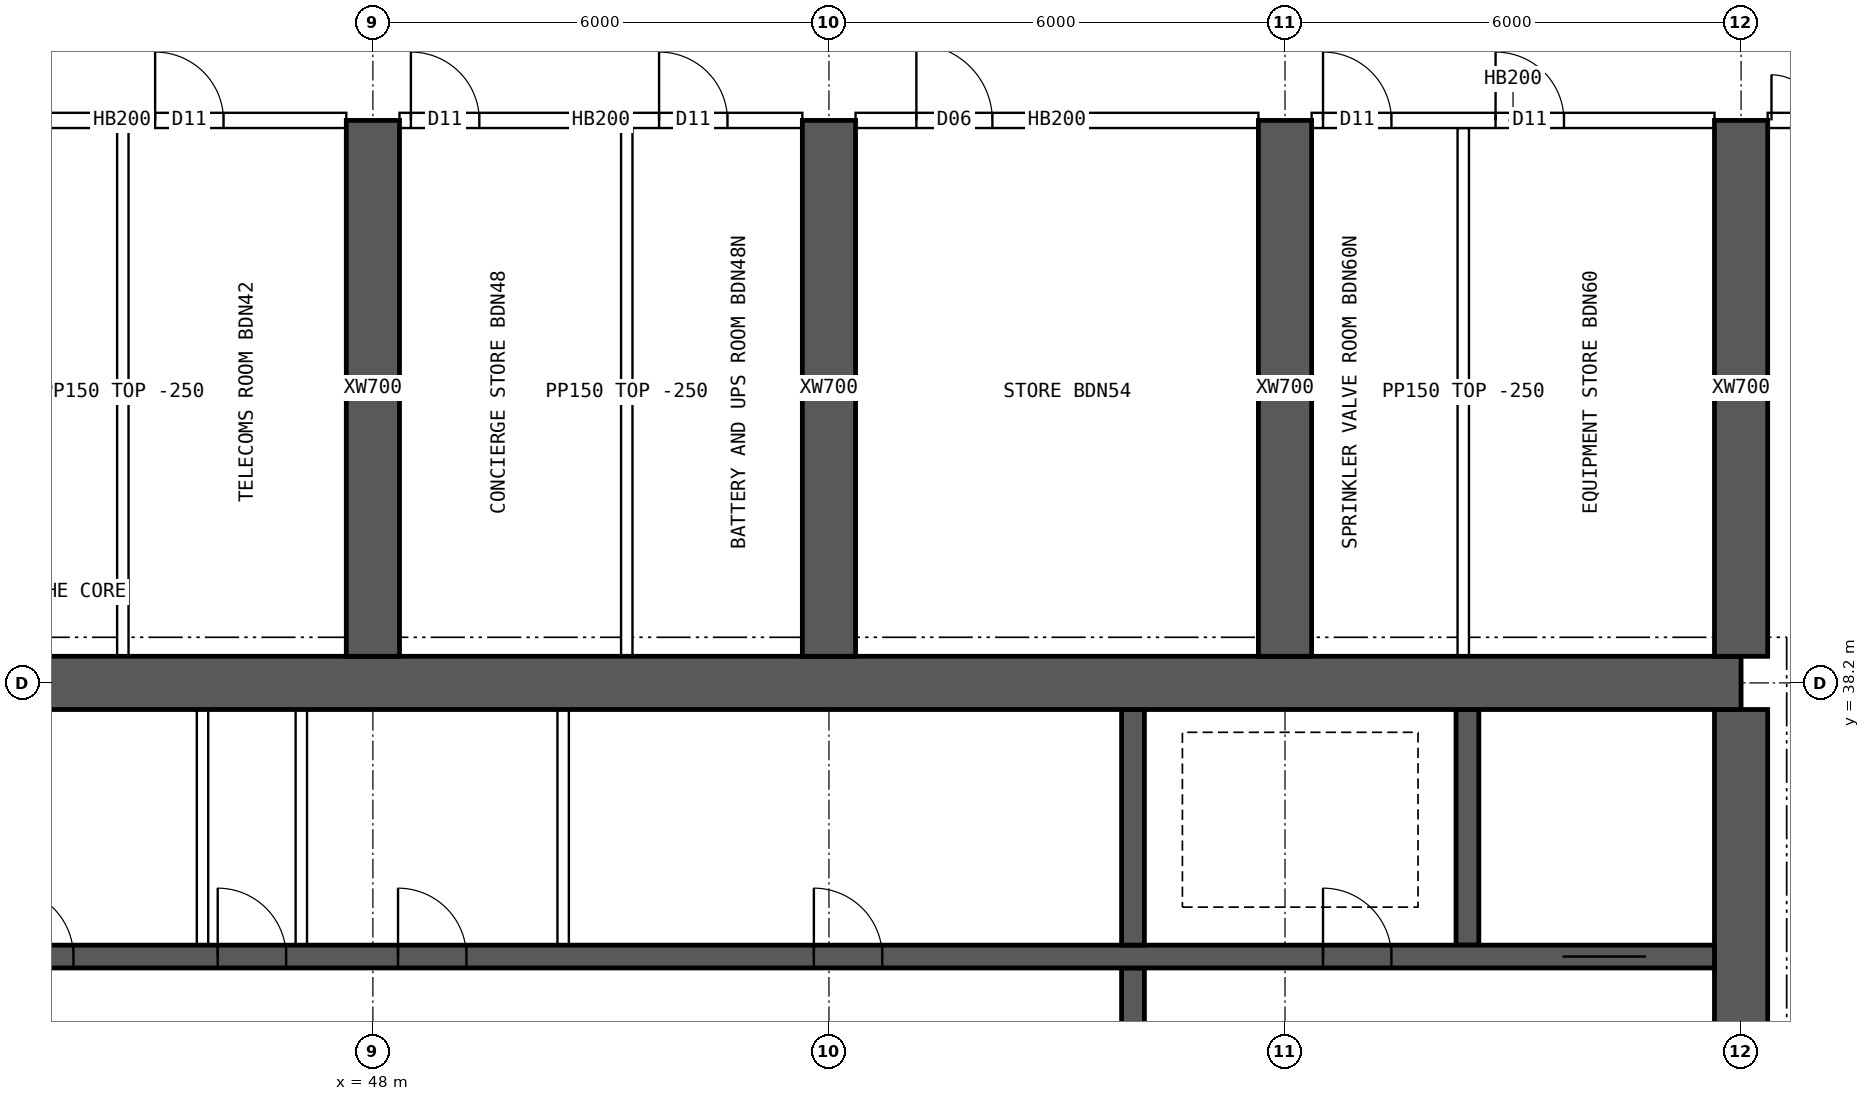
"""IFC4 building model, lengths in metres.
Left out: names, types, materials, properties, quantities, classifications, styles, units other than length and angle.
Written with IfcOpenShell. Run it as: python <this file> out.ifc"""

import sys

from ifc_helpers import new_model, si_unit, direction, frame, frame_2d, origin, place, context, subcontext, project, spatial, rectangle, extrude, element, fill, save


model = new_model("IFC4")
c1 = context("Model", 3, precision=1e-05, world=origin(), true_north=direction((0.0, 1.0)))
c2 = subcontext(c1, "Body", "Model", "MODEL_VIEW")
j1 = project(units=[si_unit("LENGTHUNIT", "METRE"), si_unit("PLANEANGLEUNIT", "RADIAN")], contexts=[c1])
p1 = place(None, origin())
s1 = spatial("IfcSite", under=j1, at=p1, CompositionType="ELEMENT")
p2 = place(p1, origin())
s2 = spatial("IfcBuilding", under=s1, at=p2, CompositionType="ELEMENT")
p3 = place(p2, frame((0.0, 0.0, 208.3)))
s3 = spatial("IfcBuildingStorey", under=s2, at=p3, CompositionType="ELEMENT", Elevation=208.3)
p4 = place(p3, frame((18.0, 38.2, 0.0), z_axis=(0.0, 0.0, 1.0), x_axis=(1.0, 0.0, 0.0)))
e1 = element("IfcWall", 1, at=p4, inside=s3, PredefinedType="SHEAR", context=c2, shape_type="SweptSolid", body=[
    extrude(rectangle(XDim=48.0, YDim=0.7, at=frame_2d((24.0, 0.0))), origin(), (0.0, 0.0, 1.0), 4.5),
])
p5 = place(p3, frame((66.0, 26.15, 0.0), z_axis=(0.0, 0.0, 1.0), x_axis=(0.0, 1.0, 0.0)))
e2 = element("IfcWall", 2, at=p5, inside=s3, PredefinedType="SHEAR", context=c2, shape_type="SweptSolid", body=[
    extrude(rectangle(XDim=11.7, YDim=0.7, at=frame_2d((5.85, 0.0))), origin(), (0.0, 0.0, 1.0), 4.5),
])
p6 = place(p5, frame((5.15, 0.0, 0.0)))
e3 = element("IfcOpeningElement", 3, at=p6, cuts=e2, PredefinedType="OPENING", context=c2, shape_type="SweptSolid", body=[
    extrude(rectangle(XDim=1.2, YDim=2.1, at=frame_2d((0.6, 1.05))), frame((0.0, 0.36, 0.0), z_axis=(0.0, -1.0, 0.0), x_axis=(1.0, 0.0, 0.0)), (0.0, 0.0, 1.0), 0.72),
])
p7 = place(p3, frame((18.35, 34.6, 0.0), z_axis=(0.0, 0.0, 1.0), x_axis=(1.0, 0.0, 0.0)))
e4 = element("IfcWall", 4, at=p7, inside=s3, PredefinedType="SHEAR", context=c2, shape_type="SweptSolid", body=[
    extrude(rectangle(XDim=47.3, YDim=0.3, at=frame_2d((23.65, 0.0))), origin(), (0.0, 0.0, 1.0), 4.5),
])
p8 = place(p7, frame((0.9, 0.0, 0.0)))
e5 = element("IfcOpeningElement", 5, at=p8, cuts=e4, PredefinedType="OPENING", context=c2, shape_type="SweptSolid", body=[
    extrude(rectangle(XDim=1.1, YDim=2.1, at=frame_2d((0.55, 1.05))), frame((0.0, 0.16, 0.0), z_axis=(0.0, -1.0, 0.0), x_axis=(1.0, 0.0, 0.0)), (0.0, 0.0, 1.0), 0.32),
])
p9 = place(p7, frame((45.3, 0.0, 0.0)))
e6 = element("IfcOpeningElement", 6, at=p9, cuts=e4, PredefinedType="OPENING", context=c2, shape_type="SweptSolid", body=[
    extrude(rectangle(XDim=1.1, YDim=2.1, at=frame_2d((0.55, 1.05))), frame((0.0, 0.16, 0.0), z_axis=(0.0, -1.0, 0.0), x_axis=(1.0, 0.0, 0.0)), (0.0, 0.0, 1.0), 0.32),
])
p10 = place(p7, frame((4.25, 0.0, 0.0)))
e7 = element("IfcOpeningElement", 7, at=p10, cuts=e4, PredefinedType="OPENING", context=c2, shape_type="SweptSolid", body=[
    extrude(rectangle(XDim=0.9, YDim=2.1, at=frame_2d((0.45, 1.05))), frame((0.0, 0.16, 0.0), z_axis=(0.0, -1.0, 0.0), x_axis=(1.0, 0.0, 0.0)), (0.0, 0.0, 1.0), 0.32),
])
p11 = place(p7, frame((42.15, 0.0, 0.0)))
e8 = element("IfcOpeningElement", 8, at=p11, cuts=e4, PredefinedType="OPENING", context=c2, shape_type="SweptSolid", body=[
    extrude(rectangle(XDim=0.9, YDim=2.1, at=frame_2d((0.45, 1.05))), frame((0.0, 0.16, 0.0), z_axis=(0.0, -1.0, 0.0), x_axis=(1.0, 0.0, 0.0)), (0.0, 0.0, 1.0), 0.32),
])
p12 = place(p7, frame((9.025, 0.0, 0.0)))
e9 = element("IfcOpeningElement", 9, at=p12, cuts=e4, PredefinedType="OPENING", context=c2, shape_type="SweptSolid", body=[
    extrude(rectangle(XDim=0.9, YDim=2.1, at=frame_2d((0.45, 1.05))), frame((0.0, 0.16, 0.0), z_axis=(0.0, -1.0, 0.0), x_axis=(1.0, 0.0, 0.0)), (0.0, 0.0, 1.0), 0.32),
])
p13 = place(p7, frame((12.999, 0.0, 0.0)))
e10 = element("IfcOpeningElement", 10, at=p13, cuts=e4, PredefinedType="OPENING", context=c2, shape_type="SweptSolid", body=[
    extrude(rectangle(XDim=0.9, YDim=2.1, at=frame_2d((0.45, 1.05))), frame((0.0, 0.16, 0.0), z_axis=(0.0, -1.0, 0.0), x_axis=(1.0, 0.0, 0.0)), (0.0, 0.0, 1.0), 0.32),
])
p14 = place(p7, frame((16.646, 0.0, 0.0)))
e11 = element("IfcOpeningElement", 11, at=p14, cuts=e4, PredefinedType="OPENING", context=c2, shape_type="SweptSolid", body=[
    extrude(rectangle(XDim=0.9, YDim=2.1, at=frame_2d((0.45, 1.05))), frame((0.0, 0.16, 0.0), z_axis=(0.0, -1.0, 0.0), x_axis=(1.0, 0.0, 0.0)), (0.0, 0.0, 1.0), 0.32),
])
p15 = place(p7, frame((20.405, 0.0, 0.0)))
e12 = element("IfcOpeningElement", 12, at=p15, cuts=e4, PredefinedType="OPENING", context=c2, shape_type="SweptSolid", body=[
    extrude(rectangle(XDim=0.9, YDim=2.1, at=frame_2d((0.45, 1.05))), frame((0.0, 0.16, 0.0), z_axis=(0.0, -1.0, 0.0), x_axis=(1.0, 0.0, 0.0)), (0.0, 0.0, 1.0), 0.32),
])
p16 = place(p7, frame((24.811, 0.0, 0.0)))
e13 = element("IfcOpeningElement", 13, at=p16, cuts=e4, PredefinedType="OPENING", context=c2, shape_type="SweptSolid", body=[
    extrude(rectangle(XDim=0.9, YDim=2.1, at=frame_2d((0.45, 1.05))), frame((0.0, 0.16, 0.0), z_axis=(0.0, -1.0, 0.0), x_axis=(1.0, 0.0, 0.0)), (0.0, 0.0, 1.0), 0.32),
])
p17 = place(p7, frame((27.608, 0.0, 0.0)))
e14 = element("IfcOpeningElement", 14, at=p17, cuts=e4, PredefinedType="OPENING", context=c2, shape_type="SweptSolid", body=[
    extrude(rectangle(XDim=0.9, YDim=2.1, at=frame_2d((0.45, 1.05))), frame((0.0, 0.16, 0.0), z_axis=(0.0, -1.0, 0.0), x_axis=(1.0, 0.0, 0.0)), (0.0, 0.0, 1.0), 0.32),
])
p18 = place(p7, frame((29.981, 0.0, 0.0)))
e15 = element("IfcOpeningElement", 15, at=p18, cuts=e4, PredefinedType="OPENING", context=c2, shape_type="SweptSolid", body=[
    extrude(rectangle(XDim=0.9, YDim=2.1, at=frame_2d((0.45, 1.05))), frame((0.0, 0.16, 0.0), z_axis=(0.0, -1.0, 0.0), x_axis=(1.0, 0.0, 0.0)), (0.0, 0.0, 1.0), 0.32),
])
p19 = place(p7, frame((35.451, 0.0, 0.0)))
e16 = element("IfcOpeningElement", 16, at=p19, cuts=e4, PredefinedType="OPENING", context=c2, shape_type="SweptSolid", body=[
    extrude(rectangle(XDim=0.9, YDim=2.1, at=frame_2d((0.45, 1.05))), frame((0.0, 0.16, 0.0), z_axis=(0.0, -1.0, 0.0), x_axis=(1.0, 0.0, 0.0)), (0.0, 0.0, 1.0), 0.32),
])
p20 = place(p3, frame((58.0, 30.55, 0.0), z_axis=(0.0, 0.0, 1.0), x_axis=(0.0, 1.0, 0.0)))
e17 = element("IfcWall", 17, at=p20, inside=s3, PredefinedType="SHEAR", context=c2, shape_type="SweptSolid", body=[
    extrude(rectangle(XDim=3.9, YDim=0.3, at=frame_2d((1.95, 0.0))), origin(), (0.0, 0.0, 1.0), 4.5),
])
p21 = place(p20, frame((1.4, 0.0, 0.0)))
e18 = element("IfcOpeningElement", 18, at=p21, cuts=e17, PredefinedType="OPENING", context=c2, shape_type="SweptSolid", body=[
    extrude(rectangle(XDim=1.2, YDim=2.1, at=frame_2d((0.6, 1.05))), frame((0.0, 0.16, 0.0), z_axis=(0.0, -1.0, 0.0), x_axis=(1.0, 0.0, 0.0)), (0.0, 0.0, 1.0), 0.32),
])
for number, where, z_axis, x_axis in (
    (19, (62.4, 34.75, 0.0), (0.0, 0.0, 1.0), (0.0, 1.0, 0.0)),
    (20, (58.0, 34.75, 0.0), (0.0, 0.0, 1.0), (0.0, 1.0, 0.0)),
):
    element("IfcWall", number, at=place(p3, frame(where, z_axis=z_axis, x_axis=x_axis)), inside=s3, PredefinedType="SHEAR", context=c2, shape_type="SweptSolid", body=[
        extrude(rectangle(XDim=3.1, YDim=0.3, at=frame_2d((1.55, 0.0))), origin(), (0.0, 0.0, 1.0), 4.5),
    ])
for number, where, z_axis, x_axis in (
    (21, (48.0, 38.55, 0.0), (0.0, 0.0, 1.0), (0.0, 1.0, 0.0)),
    (22, (54.0, 38.55, 0.0), (0.0, 0.0, 1.0), (0.0, 1.0, 0.0)),
    (23, (60.0, 38.55, 0.0), (0.0, 0.0, 1.0), (0.0, 1.0, 0.0)),
    (24, (66.0, 38.55, 0.0), (0.0, 0.0, 1.0), (0.0, 1.0, 0.0)),
):
    element("IfcWall", number, at=place(p3, frame(where, z_axis=z_axis, x_axis=x_axis)), inside=s3, PredefinedType="SHEAR", context=c2, shape_type="SweptSolid", body=[
        extrude(rectangle(XDim=7.05, YDim=0.7, at=frame_2d((3.525, 0.0))), origin(), (0.0, 0.0, 1.0), 4.5),
    ])
for number, where, z_axis, x_axis in (
    (25, (45.758, 34.75, 0.0), (0.0, 0.0, 1.0), (0.0, 1.0, 0.0)),
    (26, (47.058, 34.75, 0.0), (0.0, 0.0, 1.0), (0.0, 1.0, 0.0)),
    (27, (50.503, 34.75, 0.0), (0.0, 0.0, 1.0), (0.0, 1.0, 0.0)),
):
    element("IfcWall", number, at=place(p3, frame(where, z_axis=z_axis, x_axis=x_axis)), inside=s3, PredefinedType="SOLIDWALL", context=c2, shape_type="SweptSolid", body=[
        extrude(rectangle(XDim=3.1, YDim=0.15, at=frame_2d((1.55, 0.0))), origin(), (0.0, 0.0, 1.0), 4.25),
    ])
p22 = place(p3, frame((42.35, 45.6, 0.0), z_axis=(0.0, 0.0, 1.0), x_axis=(1.0, 0.0, 0.0)))
e28 = element("IfcWall", 28, at=p22, inside=s3, PredefinedType="SOLIDWALL", context=c2, shape_type="SweptSolid", body=[
    extrude(rectangle(XDim=5.3, YDim=0.2, at=frame_2d((2.65, 0.0))), origin(), (0.0, 0.0, 1.0), 4.25),
])
p23 = place(p22, frame((0.35, 0.0, 0.0)))
e29 = element("IfcOpeningElement", 29, at=p23, cuts=e28, PredefinedType="OPENING", context=c2, shape_type="SweptSolid", body=[
    extrude(rectangle(XDim=0.9, YDim=2.1, at=frame_2d((0.45, 1.05))), frame((0.0, 0.11, 0.0), z_axis=(0.0, -1.0, 0.0), x_axis=(1.0, 0.0, 0.0)), (0.0, 0.0, 1.0), 0.22),
])
p24 = place(p22, frame((2.785, 0.0, 0.0)))
e30 = element("IfcOpeningElement", 30, at=p24, cuts=e28, PredefinedType="OPENING", context=c2, shape_type="SweptSolid", body=[
    extrude(rectangle(XDim=0.9, YDim=2.1, at=frame_2d((0.45, 1.05))), frame((0.0, 0.11, 0.0), z_axis=(0.0, -1.0, 0.0), x_axis=(1.0, 0.0, 0.0)), (0.0, 0.0, 1.0), 0.22),
])
p25 = place(p3, frame((48.35, 45.6, 0.0), z_axis=(0.0, 0.0, 1.0), x_axis=(1.0, 0.0, 0.0)))
e31 = element("IfcWall", 31, at=p25, inside=s3, PredefinedType="SOLIDWALL", context=c2, shape_type="SweptSolid", body=[
    extrude(rectangle(XDim=5.3, YDim=0.2, at=frame_2d((2.65, 0.0))), origin(), (0.0, 0.0, 1.0), 4.25),
])
p26 = place(p25, frame((0.15, 0.0, 0.0)))
e32 = element("IfcOpeningElement", 32, at=p26, cuts=e31, PredefinedType="OPENING", context=c2, shape_type="SweptSolid", body=[
    extrude(rectangle(XDim=0.9, YDim=2.1, at=frame_2d((0.45, 1.05))), frame((0.0, 0.11, 0.0), z_axis=(0.0, -1.0, 0.0), x_axis=(1.0, 0.0, 0.0)), (0.0, 0.0, 1.0), 0.22),
])
p27 = place(p25, frame((3.415, 0.0, 0.0)))
e33 = element("IfcOpeningElement", 33, at=p27, cuts=e31, PredefinedType="OPENING", context=c2, shape_type="SweptSolid", body=[
    extrude(rectangle(XDim=0.9, YDim=2.1, at=frame_2d((0.45, 1.05))), frame((0.0, 0.11, 0.0), z_axis=(0.0, -1.0, 0.0), x_axis=(1.0, 0.0, 0.0)), (0.0, 0.0, 1.0), 0.22),
])
p28 = place(p3, frame((54.35, 45.6, 0.0), z_axis=(0.0, 0.0, 1.0), x_axis=(1.0, 0.0, 0.0)))
e34 = element("IfcWall", 34, at=p28, inside=s3, PredefinedType="SOLIDWALL", context=c2, shape_type="SweptSolid", body=[
    extrude(rectangle(XDim=5.3, YDim=0.2, at=frame_2d((2.65, 0.0))), origin(), (0.0, 0.0, 1.0), 4.25),
])
p29 = place(p28, frame((0.8, 0.0, 0.0)))
e35 = element("IfcOpeningElement", 35, at=p29, cuts=e34, PredefinedType="OPENING", context=c2, shape_type="SweptSolid", body=[
    extrude(rectangle(XDim=1.0, YDim=2.1, at=frame_2d((0.5, 1.05))), frame((0.0, 0.11, 0.0), z_axis=(0.0, -1.0, 0.0), x_axis=(1.0, 0.0, 0.0)), (0.0, 0.0, 1.0), 0.22),
])
p30 = place(p3, frame((60.35, 45.6, 0.0), z_axis=(0.0, 0.0, 1.0), x_axis=(1.0, 0.0, 0.0)))
e36 = element("IfcWall", 36, at=p30, inside=s3, PredefinedType="SOLIDWALL", context=c2, shape_type="SweptSolid", body=[
    extrude(rectangle(XDim=5.3, YDim=0.2, at=frame_2d((2.65, 0.0))), origin(), (0.0, 0.0, 1.0), 4.25),
])
p31 = place(p30, frame((0.15, 0.0, 0.0)))
e37 = element("IfcOpeningElement", 37, at=p31, cuts=e36, PredefinedType="OPENING", context=c2, shape_type="SweptSolid", body=[
    extrude(rectangle(XDim=0.9, YDim=2.1, at=frame_2d((0.45, 1.05))), frame((0.0, 0.11, 0.0), z_axis=(0.0, -1.0, 0.0), x_axis=(1.0, 0.0, 0.0)), (0.0, 0.0, 1.0), 0.22),
])
p32 = place(p30, frame((2.42, 0.0, 0.0)))
e38 = element("IfcOpeningElement", 38, at=p32, cuts=e36, PredefinedType="OPENING", context=c2, shape_type="SweptSolid", body=[
    extrude(rectangle(XDim=0.9, YDim=2.1, at=frame_2d((0.45, 1.05))), frame((0.0, 0.11, 0.0), z_axis=(0.0, -1.0, 0.0), x_axis=(1.0, 0.0, 0.0)), (0.0, 0.0, 1.0), 0.22),
])
p33 = place(p3, frame((66.35, 45.6, 0.0), z_axis=(0.0, 0.0, 1.0), x_axis=(1.0, 0.0, 0.0)))
e39 = element("IfcWall", 39, at=p33, inside=s3, PredefinedType="SOLIDWALL", context=c2, shape_type="SweptSolid", body=[
    extrude(rectangle(XDim=2.05, YDim=0.2, at=frame_2d((1.025, 0.0))), origin(), (0.0, 0.0, 1.0), 4.25),
])
p34 = place(p33, frame((0.05, 0.0, 0.0)))
e40 = element("IfcOpeningElement", 40, at=p34, cuts=e39, PredefinedType="OPENING", context=c2, shape_type="SweptSolid", body=[
    extrude(rectangle(XDim=1.2, YDim=2.1, at=frame_2d((0.6, 1.05))), frame((0.0, 0.11, 0.0), z_axis=(0.0, -1.0, 0.0), x_axis=(1.0, 0.0, 0.0)), (0.0, 0.0, 1.0), 0.22),
])
for number, where, z_axis, x_axis in (
    (41, (44.71, 38.55, 0.0), (0.0, 0.0, 1.0), (0.0, 1.0, 0.0)),
    (42, (51.34, 38.55, 0.0), (0.0, 0.0, 1.0), (0.0, 1.0, 0.0)),
    (43, (62.345, 38.55, 0.0), (0.0, 0.0, 1.0), (0.0, 1.0, 0.0)),
):
    element("IfcWall", number, at=place(p3, frame(where, z_axis=z_axis, x_axis=x_axis)), inside=s3, PredefinedType="PARTITIONING", context=c2, shape_type="SweptSolid", body=[
        extrude(rectangle(XDim=6.95, YDim=0.15, at=frame_2d((3.475, 0.0))), origin(), (0.0, 0.0, 1.0), 4.25),
    ])
p35 = place(p9, origin())
e44 = element("IfcDoor", 44, at=p35, inside=s3, OperationType="DOUBLE_DOOR_SLIDING", PredefinedType="DOOR", context=c2, shape_type="SweptSolid", body=[
    extrude(rectangle(XDim=1.1, YDim=2.1, at=frame_2d((0.55, 1.05))), frame((0.0, 0.025, 0.0), z_axis=(0.0, -1.0, 0.0), x_axis=(1.0, 0.0, 0.0)), (0.0, 0.0, 1.0), 0.05),
])
fill(e6, e44)
p36 = place(p11, origin())
e45 = element("IfcDoor", 45, at=p36, inside=s3, OperationType="SINGLE_SWING_LEFT", PredefinedType="DOOR", context=c2, shape_type="SweptSolid", body=[
    extrude(rectangle(XDim=0.9, YDim=2.1, at=frame_2d((0.45, 1.05))), frame((0.0, 0.025, 0.0), z_axis=(0.0, -1.0, 0.0), x_axis=(1.0, 0.0, 0.0)), (0.0, 0.0, 1.0), 0.05),
])
fill(e8, e45)
p37 = place(p16, origin())
e46 = element("IfcDoor", 46, at=p37, inside=s3, OperationType="SINGLE_SWING_LEFT", PredefinedType="DOOR", context=c2, shape_type="SweptSolid", body=[
    extrude(rectangle(XDim=0.9, YDim=2.1, at=frame_2d((0.45, 1.05))), frame((0.0, 0.025, 0.0), z_axis=(0.0, -1.0, 0.0), x_axis=(1.0, 0.0, 0.0)), (0.0, 0.0, 1.0), 0.05),
])
fill(e13, e46)
p38 = place(p17, origin())
e47 = element("IfcDoor", 47, at=p38, inside=s3, OperationType="SINGLE_SWING_LEFT", PredefinedType="DOOR", context=c2, shape_type="SweptSolid", body=[
    extrude(rectangle(XDim=0.9, YDim=2.1, at=frame_2d((0.45, 1.05))), frame((0.0, 0.025, 0.0), z_axis=(0.0, -1.0, 0.0), x_axis=(1.0, 0.0, 0.0)), (0.0, 0.0, 1.0), 0.05),
])
fill(e14, e47)
p39 = place(p18, origin())
e48 = element("IfcDoor", 48, at=p39, inside=s3, OperationType="SINGLE_SWING_LEFT", PredefinedType="DOOR", context=c2, shape_type="SweptSolid", body=[
    extrude(rectangle(XDim=0.9, YDim=2.1, at=frame_2d((0.45, 1.05))), frame((0.0, 0.025, 0.0), z_axis=(0.0, -1.0, 0.0), x_axis=(1.0, 0.0, 0.0)), (0.0, 0.0, 1.0), 0.05),
])
fill(e15, e48)
p40 = place(p19, origin())
e49 = element("IfcDoor", 49, at=p40, inside=s3, OperationType="SINGLE_SWING_LEFT", PredefinedType="DOOR", context=c2, shape_type="SweptSolid", body=[
    extrude(rectangle(XDim=0.9, YDim=2.1, at=frame_2d((0.45, 1.05))), frame((0.0, 0.025, 0.0), z_axis=(0.0, -1.0, 0.0), x_axis=(1.0, 0.0, 0.0)), (0.0, 0.0, 1.0), 0.05),
])
fill(e16, e49)
p41 = place(p34, origin())
e50 = element("IfcDoor", 50, at=p41, inside=s3, OperationType="DOUBLE_DOOR_SINGLE_SWING", PredefinedType="DOOR", context=c2, shape_type="SweptSolid", body=[
    extrude(rectangle(XDim=1.2, YDim=2.1, at=frame_2d((0.6, 1.05))), frame((0.0, 0.025, 0.0), z_axis=(0.0, -1.0, 0.0), x_axis=(1.0, 0.0, 0.0)), (0.0, 0.0, 1.0), 0.05),
])
fill(e40, e50)
p42 = place(p24, origin())
e51 = element("IfcDoor", 51, at=p42, inside=s3, OperationType="SINGLE_SWING_LEFT", PredefinedType="DOOR", context=c2, shape_type="SweptSolid", body=[
    extrude(rectangle(XDim=0.9, YDim=2.1, at=frame_2d((0.45, 1.05))), frame((0.0, 0.025, 0.0), z_axis=(0.0, -1.0, 0.0), x_axis=(1.0, 0.0, 0.0)), (0.0, 0.0, 1.0), 0.05),
])
fill(e30, e51)
p43 = place(p26, origin())
e52 = element("IfcDoor", 52, at=p43, inside=s3, OperationType="SINGLE_SWING_LEFT", PredefinedType="DOOR", context=c2, shape_type="SweptSolid", body=[
    extrude(rectangle(XDim=0.9, YDim=2.1, at=frame_2d((0.45, 1.05))), frame((0.0, 0.025, 0.0), z_axis=(0.0, -1.0, 0.0), x_axis=(1.0, 0.0, 0.0)), (0.0, 0.0, 1.0), 0.05),
])
fill(e32, e52)
p44 = place(p27, origin())
e53 = element("IfcDoor", 53, at=p44, inside=s3, OperationType="SINGLE_SWING_LEFT", PredefinedType="DOOR", context=c2, shape_type="SweptSolid", body=[
    extrude(rectangle(XDim=0.9, YDim=2.1, at=frame_2d((0.45, 1.05))), frame((0.0, 0.025, 0.0), z_axis=(0.0, -1.0, 0.0), x_axis=(1.0, 0.0, 0.0)), (0.0, 0.0, 1.0), 0.05),
])
fill(e33, e53)
p45 = place(p29, origin())
e54 = element("IfcDoor", 54, at=p45, inside=s3, OperationType="SINGLE_SWING_LEFT", PredefinedType="DOOR", context=c2, shape_type="SweptSolid", body=[
    extrude(rectangle(XDim=1.0, YDim=2.1, at=frame_2d((0.5, 1.05))), frame((0.0, 0.025, 0.0), z_axis=(0.0, -1.0, 0.0), x_axis=(1.0, 0.0, 0.0)), (0.0, 0.0, 1.0), 0.05),
])
fill(e35, e54)
p46 = place(p31, origin())
e55 = element("IfcDoor", 55, at=p46, inside=s3, OperationType="SINGLE_SWING_LEFT", PredefinedType="DOOR", context=c2, shape_type="SweptSolid", body=[
    extrude(rectangle(XDim=0.9, YDim=2.1, at=frame_2d((0.45, 1.05))), frame((0.0, 0.025, 0.0), z_axis=(0.0, -1.0, 0.0), x_axis=(1.0, 0.0, 0.0)), (0.0, 0.0, 1.0), 0.05),
])
fill(e37, e55)
p47 = place(p32, origin())
e56 = element("IfcDoor", 56, at=p47, inside=s3, OperationType="SINGLE_SWING_LEFT", PredefinedType="DOOR", context=c2, shape_type="SweptSolid", body=[
    extrude(rectangle(XDim=0.9, YDim=2.1, at=frame_2d((0.45, 1.05))), frame((0.0, 0.025, 0.0), z_axis=(0.0, -1.0, 0.0), x_axis=(1.0, 0.0, 0.0)), (0.0, 0.0, 1.0), 0.05),
])
fill(e38, e56)
save(model, sys.argv[1])
